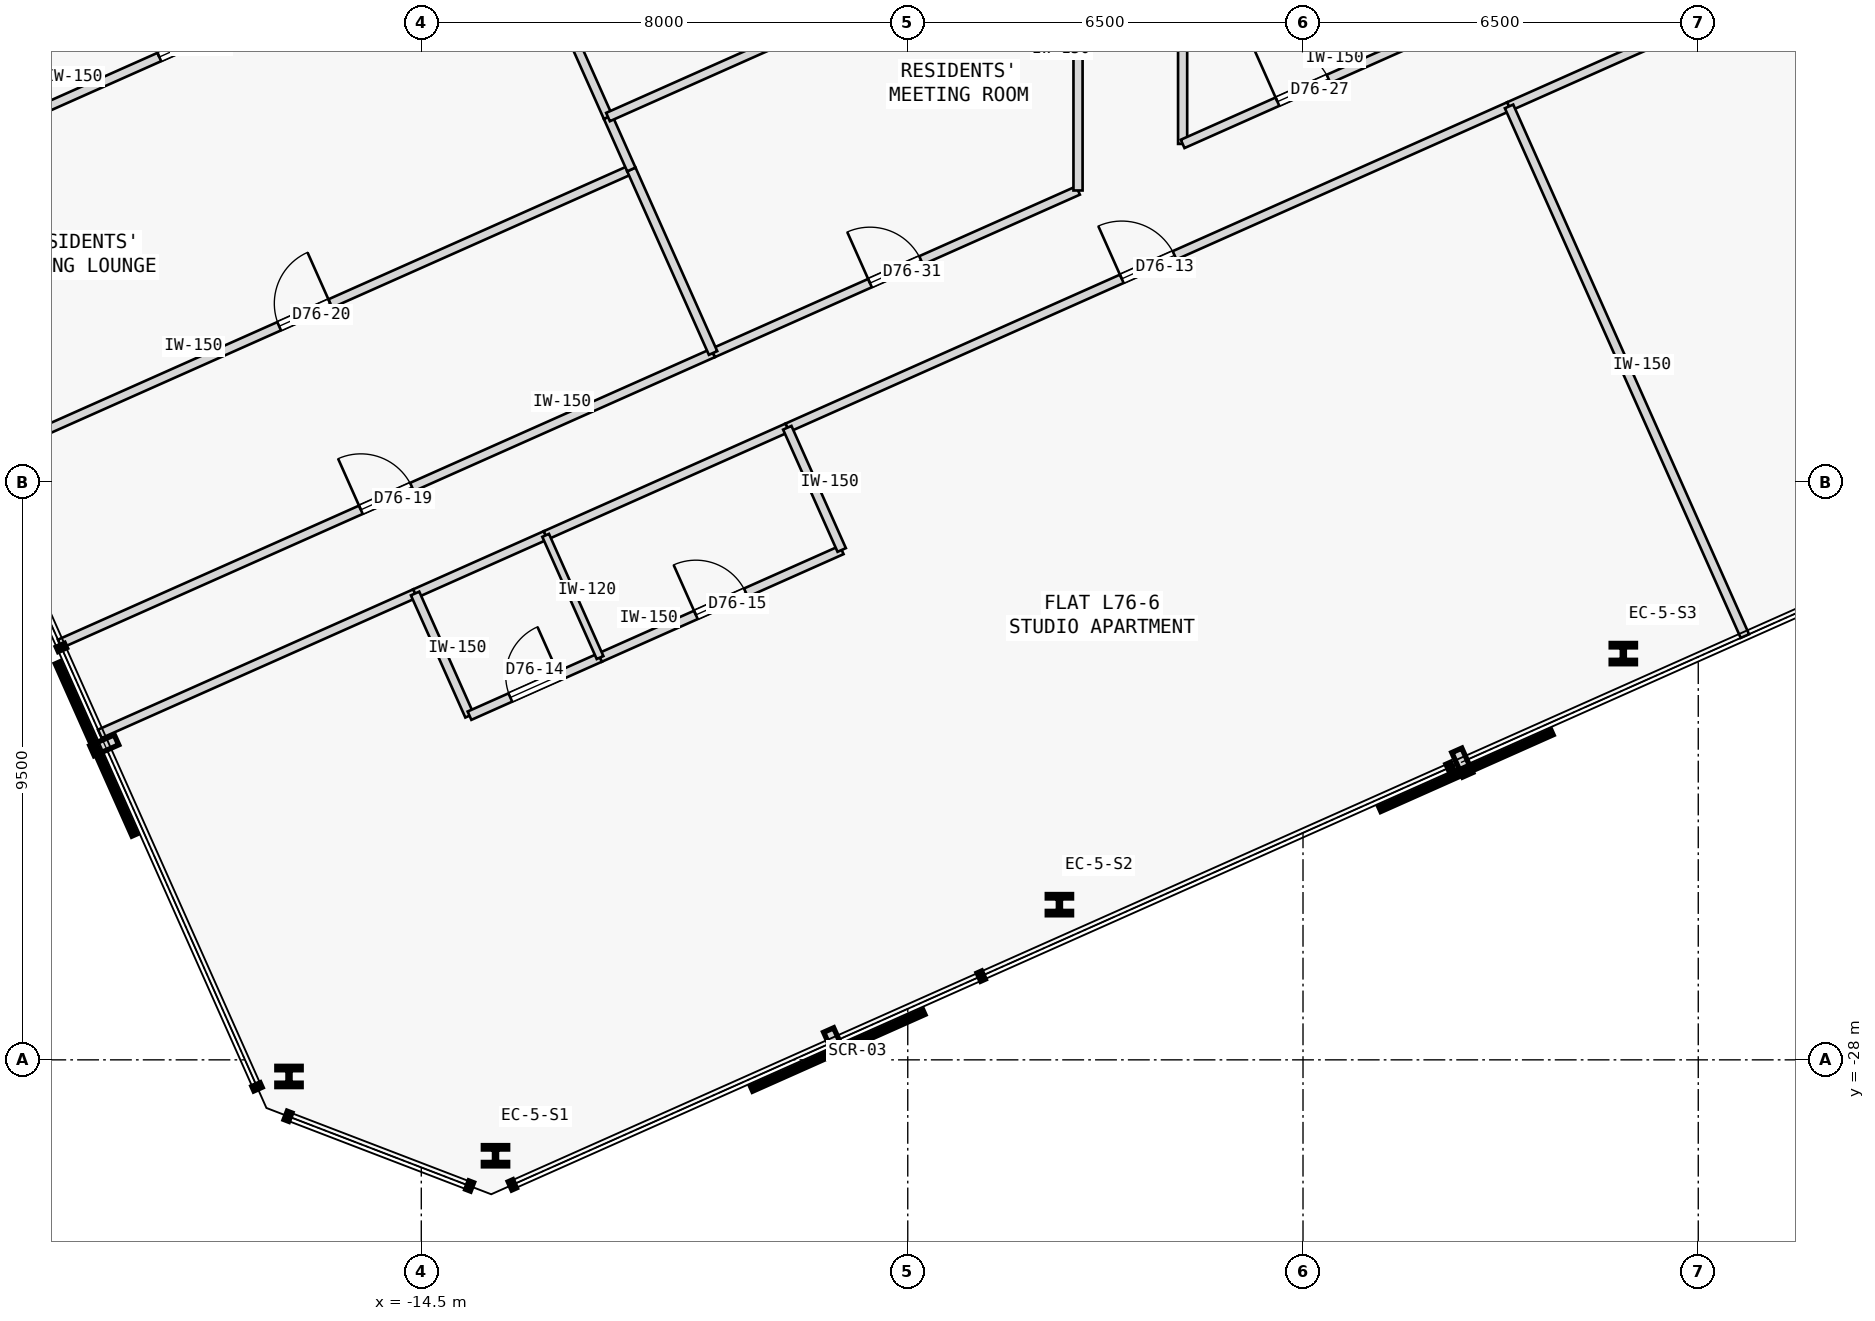
"""IFC4 building model, lengths in metres.
Left out: names, types, materials, properties, quantities, classifications, styles, units other than length and angle.
Written with IfcOpenShell. Run it as: python <this file> out.ifc"""

import sys

from ifc_helpers import new_model, si_unit, direction, frame, frame_2d, origin, origin_2d, place, context, subcontext, project, spatial, rectangle, i_section, extrude, element, fill, save


model = new_model("IFC4")
c1 = context("Model", 3, precision=1e-05, world=origin(), true_north=direction((0.0, 1.0)))
c2 = subcontext(c1, "Body", "Model", "MODEL_VIEW")
j1 = project(units=[si_unit("LENGTHUNIT", "METRE"), si_unit("PLANEANGLEUNIT", "RADIAN")], contexts=[c1])
p1 = place(None, origin())
s1 = spatial("IfcSite", under=j1, at=p1, CompositionType="ELEMENT")
p2 = place(p1, origin())
s2 = spatial("IfcBuilding", under=s1, at=p2, CompositionType="ELEMENT")
p3 = place(p2, frame((0.0, 0.0, 285.25)))
s3 = spatial("IfcBuildingStorey", under=s2, at=p3, CompositionType="ELEMENT", Elevation=285.25)
for number, where, z_axis, x_axis in (
    (1, (-13.28, -29.577, 0.0), (0.0, 0.0, 1.0), (1.0, 0.0, 0.0)),
    (2, (-4.006, -25.448, 0.0), (0.0, 0.0, 1.0), (1.0, 0.0, 0.0)),
    (3, (5.268, -21.319, 0.0), (0.0, 0.0, 1.0), (1.0, 0.0, 0.0)),
    (4, (-16.676, -28.273, 0.0), (0.0, 0.0, 1.0), (1.0, 0.0, 0.0)),
):
    element("IfcColumn", number, at=place(p3, frame(where, z_axis=z_axis, x_axis=x_axis)), inside=s3, PredefinedType="COLUMN", context=c2, shape_type="SweptSolid", body=[
        extrude(i_section(OverallWidth=0.401, OverallDepth=0.335, WebThickness=0.036, FlangeThickness=0.058, FilletRadius=0.015, at=origin_2d()), origin(), (0.0, 0.0, 1.0), 3.35),
    ])
p4 = place(p3, frame((-19.786, -22.639, 0.0), z_axis=(0.0, 0.0, 1.0), x_axis=(0.913559465571, 0.406705179295, 0.0)))
e5 = element("IfcWall", 5, at=p4, inside=s3, PredefinedType="PARTITIONING", context=c2, shape_type="SweptSolid", body=[
    extrude(rectangle(XDim=5.675, YDim=0.15, at=frame_2d((2.837, 0.0))), origin(), (0.0, 0.0, 1.0), 3.125),
])
p5 = place(p3, frame((-8.481, -17.605, 0.0), z_axis=(0.0, 0.0, 1.0), x_axis=(0.913546352883, 0.406734632328, 0.0)))
e6 = element("IfcWall", 6, at=p5, inside=s3, PredefinedType="PARTITIONING", context=c2, shape_type="SweptSolid", body=[
    extrude(rectangle(XDim=12.993, YDim=0.15, at=frame_2d((6.497, 0.0))), origin(), (0.0, 0.0, 1.0), 3.125),
])
p6 = place(p5, frame((6.021, 0.0, 0.0)))
e7 = element("IfcOpeningElement", 7, at=p6, cuts=e6, PredefinedType="OPENING", context=c2, shape_type="SweptSolid", body=[
    extrude(rectangle(XDim=0.95, YDim=2.15, at=frame_2d((0.475, 1.075))), frame((0.0, 0.085, 0.0), z_axis=(0.0, -1.0, 0.0), x_axis=(1.0, 0.0, 0.0)), (0.0, 0.0, 1.0), 0.17),
])
p7 = place(p3, frame((-14.602, -20.331, 0.0), z_axis=(0.0, 0.0, 1.0), x_axis=(0.913502828817, 0.406832375486, 0.0)))
e8 = element("IfcWall", 8, at=p7, inside=s3, PredefinedType="PARTITIONING", context=c2, shape_type="SweptSolid", body=[
    extrude(rectangle(XDim=2.35, YDim=0.15, at=frame_2d((1.175, 0.0))), origin(), (0.0, 0.0, 1.0), 3.125),
])
p8 = place(p3, frame((-12.455, -19.375, 0.0), z_axis=(0.0, 0.0, 1.0), x_axis=(0.913545193015, 0.406737237438, 0.0)))
e9 = element("IfcWall", 9, at=p8, inside=s3, PredefinedType="PARTITIONING", context=c2, shape_type="SweptSolid", body=[
    extrude(rectangle(XDim=4.35, YDim=0.15, at=frame_2d((2.175, 0.0))), origin(), (0.0, 0.0, 1.0), 3.125),
])
p9 = place(p3, frame((3.388, -12.321, 0.0), z_axis=(0.0, 0.0, 1.0), x_axis=(0.913552886643, 0.406719956857, 0.0)))
e10 = element("IfcWall", 10, at=p9, inside=s3, PredefinedType="PARTITIONING", context=c2, shape_type="SweptSolid", body=[
    extrude(rectangle(XDim=6.933, YDim=0.15, at=frame_2d((3.467, 0.0))), origin(), (0.0, 0.0, 1.0), 3.125),
])
p10 = place(p3, frame((-20.445, -21.159, 0.0), z_axis=(0.0, 0.0, 1.0), x_axis=(0.913547681516, 0.406731648137, 0.0)))
e11 = element("IfcWall", 11, at=p10, inside=s3, PredefinedType="PARTITIONING", context=c2, shape_type="SweptSolid", body=[
    extrude(rectangle(XDim=11.76, YDim=0.15, at=frame_2d((5.88, 0.0))), origin(), (0.0, 0.0, 1.0), 3.125),
])
p11 = place(p10, frame((5.42, 0.0, 0.0)))
e12 = element("IfcOpeningElement", 12, at=p11, cuts=e11, PredefinedType="OPENING", context=c2, shape_type="SweptSolid", body=[
    extrude(rectangle(XDim=0.92, YDim=2.15, at=frame_2d((0.46, 1.075))), frame((0.0, 0.085, 0.0), z_axis=(0.0, -1.0, 0.0), x_axis=(1.0, 0.0, 0.0)), (0.0, 0.0, 1.0), 0.17),
])
p12 = place(p3, frame((-1.98, -12.938, 0.0), z_axis=(0.0, 0.0, 1.0), x_axis=(-9.3049223e-05, 0.999999995671, 0.0)))
e13 = element("IfcWall", 13, at=p12, inside=s3, PredefinedType="PARTITIONING", context=c2, shape_type="SweptSolid", body=[
    extrude(rectangle(XDim=2.624, YDim=0.15, at=frame_2d((1.312, 0.0))), origin(), (0.0, 0.0, 1.0), 3.125),
])
p13 = place(p3, frame((-1.98, -12.938, 0.0), z_axis=(0.0, 0.0, 1.0), x_axis=(0.913530252303, 0.406770793111, 0.0)))
e14 = element("IfcWall", 14, at=p13, inside=s3, PredefinedType="PARTITIONING", context=c2, shape_type="SweptSolid", body=[
    extrude(rectangle(XDim=4.334, YDim=0.15, at=frame_2d((2.167, 0.0))), origin(), (0.0, 0.0, 1.0), 3.125),
])
p14 = place(p13, frame((1.707, 0.0, 0.0)))
e15 = element("IfcOpeningElement", 15, at=p14, cuts=e14, PredefinedType="OPENING", context=c2, shape_type="SweptSolid", body=[
    extrude(rectangle(XDim=0.92, YDim=2.15, at=frame_2d((0.46, 1.075))), frame((0.0, 0.085, 0.0), z_axis=(0.0, -1.0, 0.0), x_axis=(1.0, 0.0, 0.0)), (0.0, 0.0, 1.0), 0.17),
])
p15 = place(p3, frame((-9.702, -16.375, 0.0), z_axis=(0.0, 0.0, 1.0), x_axis=(0.913552389019, 0.406721074594, 0.0)))
e16 = element("IfcWall", 16, at=p15, inside=s3, PredefinedType="PARTITIONING", context=c2, shape_type="SweptSolid", body=[
    extrude(rectangle(XDim=6.57, YDim=0.15, at=frame_2d((3.285, 0.0))), origin(), (0.0, 0.0, 1.0), 3.125),
])
p16 = place(p15, frame((2.825, 0.0, 0.0)))
e17 = element("IfcOpeningElement", 17, at=p16, cuts=e16, PredefinedType="OPENING", context=c2, shape_type="SweptSolid", body=[
    extrude(rectangle(XDim=0.92, YDim=2.15, at=frame_2d((0.46, 1.075))), frame((0.0, 0.085, 0.0), z_axis=(0.0, -1.0, 0.0), x_axis=(1.0, 0.0, 0.0)), (0.0, 0.0, 1.0), 0.17),
])
p17 = place(p3, frame((-3.7, -13.703, 0.0), z_axis=(0.0, 0.0, 1.0), x_axis=(5.2512734e-05, 0.999999998621, 0.0)))
e18 = element("IfcWall", 18, at=p17, inside=s3, PredefinedType="PARTITIONING", context=c2, shape_type="SweptSolid", body=[
    extrude(rectangle(XDim=4.649, YDim=0.15, at=frame_2d((2.325, 0.0))), origin(), (0.0, 0.0, 1.0), 3.125),
])
p18 = place(p3, frame((-13.707, -22.34, 0.0), z_axis=(0.0, 0.0, 1.0), x_axis=(-0.406725294076, 0.913550510459, 0.0)))
e19 = element("IfcWall", 19, at=p18, inside=s3, PredefinedType="PARTITIONING", context=c2, shape_type="SweptSolid", body=[
    extrude(rectangle(XDim=2.2, YDim=0.15, at=frame_2d((1.1, 0.0))), origin(), (0.0, 0.0, 1.0), 3.125),
])
p19 = place(p3, frame((-13.707, -22.34, 0.0), z_axis=(0.0, 0.0, 1.0), x_axis=(0.913541436194, 0.406745675276, 0.0)))
e20 = element("IfcWall", 20, at=p19, inside=s3, PredefinedType="PARTITIONING", context=c2, shape_type="SweptSolid", body=[
    extrude(rectangle(XDim=2.35, YDim=0.15, at=frame_2d((1.175, 0.0))), origin(), (0.0, 0.0, 1.0), 3.125),
])
p20 = place(p19, frame((0.735, 0.0, 0.0)))
e21 = element("IfcOpeningElement", 21, at=p20, cuts=e20, PredefinedType="OPENING", context=c2, shape_type="SweptSolid", body=[
    extrude(rectangle(XDim=0.88, YDim=2.15, at=frame_2d((0.44, 1.075))), frame((0.0, 0.085, 0.0), z_axis=(0.0, -1.0, 0.0), x_axis=(1.0, 0.0, 0.0)), (0.0, 0.0, 1.0), 0.17),
])
p21 = place(p3, frame((-11.56, -21.385, 0.0), z_axis=(0.0, 0.0, 1.0), x_axis=(0.913533624044, 0.406763220732, 0.0)))
e22 = element("IfcWall", 22, at=p21, inside=s3, PredefinedType="PARTITIONING", context=c2, shape_type="SweptSolid", body=[
    extrude(rectangle(XDim=4.35, YDim=0.15, at=frame_2d((2.175, 0.0))), origin(), (0.0, 0.0, 1.0), 3.125),
])
p22 = place(p21, frame((1.725, 0.0, 0.0)))
e23 = element("IfcOpeningElement", 23, at=p22, cuts=e22, PredefinedType="OPENING", context=c2, shape_type="SweptSolid", body=[
    extrude(rectangle(XDim=0.9, YDim=2.15, at=frame_2d((0.45, 1.075))), frame((0.0, 0.085, 0.0), z_axis=(0.0, -1.0, 0.0), x_axis=(1.0, 0.0, 0.0)), (0.0, 0.0, 1.0), 0.17),
])
p23 = place(p3, frame((-7.586, -19.615, 0.0), z_axis=(0.0, 0.0, 1.0), x_axis=(-0.406817905151, 0.913509273105, 0.0)))
e24 = element("IfcWall", 24, at=p23, inside=s3, PredefinedType="PARTITIONING", context=c2, shape_type="SweptSolid", body=[
    extrude(rectangle(XDim=2.2, YDim=0.15, at=frame_2d((1.1, 0.0))), origin(), (0.0, 0.0, 1.0), 3.125),
])
p24 = place(p3, frame((7.267, -21.031, 0.0), z_axis=(0.0, 0.0, 1.0), x_axis=(-0.406751296215, 0.913538933504, 0.0)))
e25 = element("IfcWall", 25, at=p24, inside=s3, PredefinedType="PARTITIONING", context=c2, shape_type="SweptSolid", body=[
    extrude(rectangle(XDim=9.535, YDim=0.15, at=frame_2d((4.768, 0.0))), origin(), (0.0, 0.0, 1.0), 3.125),
])
p25 = place(p3, frame((-11.56, -21.385, 0.0), z_axis=(0.0, 0.0, 1.0), x_axis=(-0.406684063321, 0.913568865845, 0.0)))
e26 = element("IfcWall", 26, at=p25, inside=s3, PredefinedType="PARTITIONING", context=c2, shape_type="SweptSolid", body=[
    extrude(rectangle(XDim=2.2, YDim=0.12, at=frame_2d((1.1, 0.0))), origin(), (0.0, 0.0, 1.0), 3.125),
])
p26 = place(p3, frame((-21.789, -18.14, 0.0), z_axis=(0.0, 0.0, 1.0), x_axis=(0.913544247064, 0.406739362069, 0.0)))
e27 = element("IfcWall", 27, at=p26, inside=s3, PredefinedType="PARTITIONING", context=c2, shape_type="SweptSolid", body=[
    extrude(rectangle(XDim=11.76, YDim=0.15, at=frame_2d((5.88, 0.0))), origin(), (0.0, 0.0, 1.0), 3.125),
])
p27 = place(p26, frame((5.42, 0.0, 0.0)))
e28 = element("IfcOpeningElement", 28, at=p27, cuts=e27, PredefinedType="OPENING", context=c2, shape_type="SweptSolid", body=[
    extrude(rectangle(XDim=0.92, YDim=2.15, at=frame_2d((0.46, 1.075))), frame((0.0, 0.085, 0.0), z_axis=(0.0, -1.0, 0.0), x_axis=(1.0, 0.0, 0.0)), (0.0, 0.0, 1.0), 0.17),
])
p28 = place(p3, frame((-9.702, -16.375, 0.0), z_axis=(0.0, 0.0, 1.0), x_axis=(-0.406775972158, 0.913527946193, 0.0)))
e29 = element("IfcWall", 29, at=p28, inside=s3, PredefinedType="PARTITIONING", context=c2, shape_type="SweptSolid", body=[
    extrude(rectangle(XDim=3.304, YDim=0.15, at=frame_2d((1.652, 0.0))), origin(), (0.0, 0.0, 1.0), 3.125),
])
p29 = place(p3, frame((-23.76, -13.713, 0.0), z_axis=(0.0, 0.0, 1.0), x_axis=(0.913544247064, 0.406739362069, 0.0)))
e30 = element("IfcWall", 30, at=p29, inside=s3, PredefinedType="PARTITIONING", context=c2, shape_type="SweptSolid", body=[
    extrude(rectangle(XDim=11.76, YDim=0.15, at=frame_2d((5.88, 0.0))), origin(), (0.0, 0.0, 1.0), 3.125),
])
p30 = place(p29, frame((5.42, 0.0, 0.0)))
e31 = element("IfcOpeningElement", 31, at=p30, cuts=e30, PredefinedType="OPENING", context=c2, shape_type="SweptSolid", body=[
    extrude(rectangle(XDim=0.92, YDim=2.15, at=frame_2d((0.46, 1.075))), frame((0.0, 0.085, 0.0), z_axis=(0.0, -1.0, 0.0), x_axis=(1.0, 0.0, 0.0)), (0.0, 0.0, 1.0), 0.17),
])
p31 = place(p3, frame((-11.046, -13.357, 0.0), z_axis=(0.0, 0.0, 1.0), x_axis=(-0.406474743084, 0.913662018054, 0.0)))
e32 = element("IfcWall", 32, at=p31, inside=s3, PredefinedType="PARTITIONING", context=c2, shape_type="SweptSolid", body=[
    extrude(rectangle(XDim=0.943, YDim=0.15, at=frame_2d((0.471, 0.0))), origin(), (0.0, 0.0, 1.0), 3.125),
])
p32 = place(p3, frame((-11.429, -12.496, 0.0), z_axis=(0.0, 0.0, 1.0), x_axis=(-0.406782597231, 0.91352499615, 0.0)))
e33 = element("IfcWall", 33, at=p32, inside=s3, PredefinedType="PARTITIONING", context=c2, shape_type="SweptSolid", body=[
    extrude(rectangle(XDim=3.903, YDim=0.15, at=frame_2d((1.951, 0.0))), origin(), (0.0, 0.0, 1.0), 3.125),
])
p33 = place(p3, frame((-11.429, -12.496, 0.0), z_axis=(0.0, 0.0, 1.0), x_axis=(0.913544816238, 0.406738083692, 0.0)))
e34 = element("IfcWall", 34, at=p33, inside=s3, PredefinedType="PARTITIONING", context=c2, shape_type="SweptSolid", body=[
    extrude(rectangle(XDim=8.461, YDim=0.15, at=frame_2d((4.23, 0.0))), origin(), (0.0, 0.0, 1.0), 3.125),
])
p34 = place(p6, origin())
e35 = element("IfcDoor", 35, at=p34, inside=s3, OperationType="SINGLE_SWING_LEFT", PredefinedType="DOOR", context=c2, shape_type="SweptSolid", body=[
    extrude(rectangle(XDim=0.95, YDim=2.15, at=frame_2d((0.475, 1.075))), frame((0.0, 0.025, 0.0), z_axis=(0.0, -1.0, 0.0), x_axis=(1.0, 0.0, 0.0)), (0.0, 0.0, 1.0), 0.05),
])
fill(e7, e35)
p35 = place(p20, origin())
e36 = element("IfcDoor", 36, at=p35, inside=s3, OperationType="SINGLE_SWING_RIGHT", PredefinedType="DOOR", context=c2, shape_type="SweptSolid", body=[
    extrude(rectangle(XDim=0.88, YDim=2.15, at=frame_2d((0.44, 1.075))), frame((0.0, 0.025, 0.0), z_axis=(0.0, -1.0, 0.0), x_axis=(1.0, 0.0, 0.0)), (0.0, 0.0, 1.0), 0.05),
])
fill(e21, e36)
p36 = place(p22, origin())
e37 = element("IfcDoor", 37, at=p36, inside=s3, OperationType="SINGLE_SWING_LEFT", PredefinedType="DOOR", context=c2, shape_type="SweptSolid", body=[
    extrude(rectangle(XDim=0.9, YDim=2.15, at=frame_2d((0.45, 1.075))), frame((0.0, 0.025, 0.0), z_axis=(0.0, -1.0, 0.0), x_axis=(1.0, 0.0, 0.0)), (0.0, 0.0, 1.0), 0.05),
])
fill(e23, e37)
p37 = place(p11, origin())
e38 = element("IfcDoor", 38, at=p37, inside=s3, OperationType="SINGLE_SWING_LEFT", PredefinedType="DOOR", context=c2, shape_type="SweptSolid", body=[
    extrude(rectangle(XDim=0.92, YDim=2.15, at=frame_2d((0.46, 1.075))), frame((0.0, 0.025, 0.0), z_axis=(0.0, -1.0, 0.0), x_axis=(1.0, 0.0, 0.0)), (0.0, 0.0, 1.0), 0.05),
])
fill(e12, e38)
p38 = place(p27, origin())
e39 = element("IfcDoor", 39, at=p38, inside=s3, OperationType="SINGLE_SWING_RIGHT", PredefinedType="DOOR", context=c2, shape_type="SweptSolid", body=[
    extrude(rectangle(XDim=0.92, YDim=2.15, at=frame_2d((0.46, 1.075))), frame((0.0, 0.025, 0.0), z_axis=(0.0, -1.0, 0.0), x_axis=(1.0, 0.0, 0.0)), (0.0, 0.0, 1.0), 0.05),
])
fill(e28, e39)
p39 = place(p30, origin())
e40 = element("IfcDoor", 40, at=p39, inside=s3, OperationType="SINGLE_SWING_LEFT", PredefinedType="DOOR", context=c2, shape_type="SweptSolid", body=[
    extrude(rectangle(XDim=0.92, YDim=2.15, at=frame_2d((0.46, 1.075))), frame((0.0, 0.025, 0.0), z_axis=(0.0, -1.0, 0.0), x_axis=(1.0, 0.0, 0.0)), (0.0, 0.0, 1.0), 0.05),
])
fill(e31, e40)
p40 = place(p14, origin())
e41 = element("IfcDoor", 41, at=p40, inside=s3, OperationType="SINGLE_SWING_LEFT", PredefinedType="DOOR", context=c2, shape_type="SweptSolid", body=[
    extrude(rectangle(XDim=0.92, YDim=2.15, at=frame_2d((0.46, 1.075))), frame((0.0, 0.025, 0.0), z_axis=(0.0, -1.0, 0.0), x_axis=(1.0, 0.0, 0.0)), (0.0, 0.0, 1.0), 0.05),
])
fill(e15, e41)
p41 = place(p16, origin())
e42 = element("IfcDoor", 42, at=p41, inside=s3, OperationType="SINGLE_SWING_LEFT", PredefinedType="DOOR", context=c2, shape_type="SweptSolid", body=[
    extrude(rectangle(XDim=0.92, YDim=2.15, at=frame_2d((0.46, 1.075))), frame((0.0, 0.025, 0.0), z_axis=(0.0, -1.0, 0.0), x_axis=(1.0, 0.0, 0.0)), (0.0, 0.0, 1.0), 0.05),
])
fill(e17, e42)
save(model, sys.argv[1])
